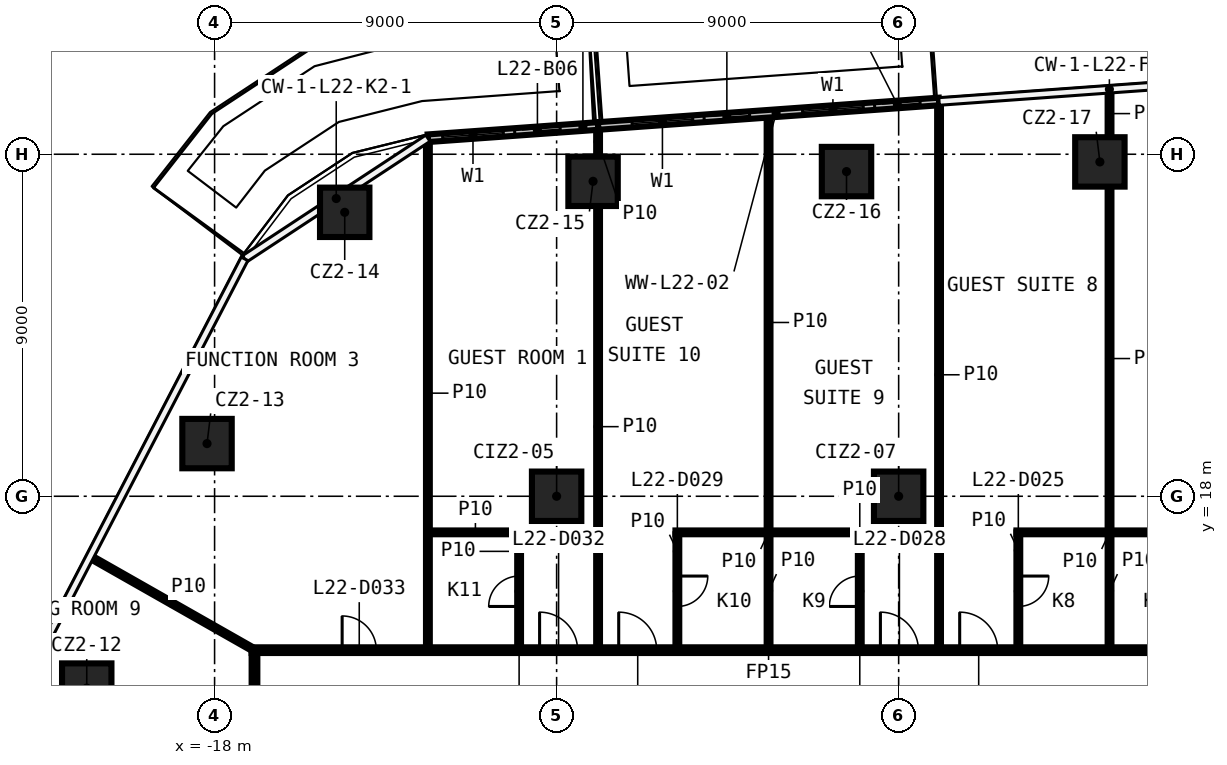
"""IFC4 building model, lengths in metres.
Left out: names, types, materials, properties, quantities, classifications, styles, units other than length and angle.
Written with IfcOpenShell. Run it as: python <this file> out.ifc"""

import sys

from ifc_helpers import new_model, si_unit, direction, frame, frame_2d, origin, origin_2d, place, context, subcontext, project, spatial, rectangle, extrude, element, fill, save


model = new_model("IFC4")
c1 = context("Model", 3, precision=1e-05, world=origin(), true_north=direction((0.0, 1.0)))
c2 = subcontext(c1, "Body", "Model", "MODEL_VIEW")
j1 = project(units=[si_unit("LENGTHUNIT", "METRE"), si_unit("PLANEANGLEUNIT", "RADIAN")], contexts=[c1])
p1 = place(None, origin())
s1 = spatial("IfcSite", under=j1, at=p1, CompositionType="ELEMENT")
p2 = place(p1, origin())
s2 = spatial("IfcBuilding", under=s1, at=p2, CompositionType="ELEMENT")
p3 = place(p2, frame((0.0, 0.0, 106.3)))
s3 = spatial("IfcBuildingStorey", under=s2, at=p3, CompositionType="ELEMENT", Elevation=106.3)
for number, where, z_axis, x_axis in (
    (1, (-21.364, 12.952, 0.0), (0.0, 0.0, 1.0), (1.0, 0.0, 0.0)),
    (2, (-18.199, 19.386, 0.0), (0.0, 0.0, 1.0), (1.0, 0.0, 0.0)),
    (3, (-14.576, 25.472, 0.0), (0.0, 0.0, 1.0), (1.0, 0.0, 0.0)),
    (4, (-8.041, 26.288, 0.0), (0.0, 0.0, 1.0), (1.0, 0.0, 0.0)),
    (5, (-1.372, 26.544, 0.0), (0.0, 0.0, 1.0), (1.0, 0.0, 0.0)),
    (6, (5.295, 26.798, 0.0), (0.0, 0.0, 1.0), (1.0, 0.0, 0.0)),
    (7, (-9.0, 18.0, 0.0), (0.0, 0.0, 1.0), (1.0, 0.0, 0.0)),
    (8, (0.0, 18.0, 0.0), (0.0, 0.0, 1.0), (1.0, 0.0, 0.0)),
):
    element("IfcColumn", number, at=place(p3, frame(where, z_axis=z_axis, x_axis=x_axis)), inside=s3, PredefinedType="COLUMN", context=c2, shape_type="SweptSolid", body=[
        extrude(rectangle(XDim=1.3, YDim=1.3, at=origin_2d()), origin(), (0.0, 0.0, 1.0), 3.3),
    ])
p4 = place(p3, frame((-17.025, 13.95, 0.0), z_axis=(0.0, 0.0, 1.0), x_axis=(1.0, 0.0, 0.0)))
e9 = element("IfcWall", 9, at=p4, inside=s3, PredefinedType="PARTITIONING", context=c2, shape_type="SweptSolid", body=[
    extrude(rectangle(XDim=34.05, YDim=0.15, at=frame_2d((17.025, 0.0))), origin(), (0.0, 0.0, 1.0), 3.3),
])
p5 = place(p4, frame((29.735, 0.0, 0.0)))
e10 = element("IfcOpeningElement", 10, at=p5, cuts=e9, PredefinedType="OPENING", context=c2, shape_type="SweptSolid", body=[
    extrude(rectangle(XDim=1.0, YDim=2.1, at=frame_2d((0.5, 1.05))), frame((0.0, 0.085, 0.0), z_axis=(0.0, -1.0, 0.0), x_axis=(1.0, 0.0, 0.0)), (0.0, 0.0, 1.0), 0.17),
])
p6 = place(p4, frame((25.513, 0.0, 0.0)))
e11 = element("IfcOpeningElement", 11, at=p6, cuts=e9, PredefinedType="OPENING", context=c2, shape_type="SweptSolid", body=[
    extrude(rectangle(XDim=1.0, YDim=2.1, at=frame_2d((0.5, 1.05))), frame((0.0, 0.085, 0.0), z_axis=(0.0, -1.0, 0.0), x_axis=(1.0, 0.0, 0.0)), (0.0, 0.0, 1.0), 0.17),
])
p7 = place(p4, frame((18.631, 0.0, 0.0)))
e12 = element("IfcOpeningElement", 12, at=p7, cuts=e9, PredefinedType="OPENING", context=c2, shape_type="SweptSolid", body=[
    extrude(rectangle(XDim=1.0, YDim=2.1, at=frame_2d((0.5, 1.05))), frame((0.0, 0.085, 0.0), z_axis=(0.0, -1.0, 0.0), x_axis=(1.0, 0.0, 0.0)), (0.0, 0.0, 1.0), 0.17),
])
p8 = place(p4, frame((16.545, 0.0, 0.0)))
e13 = element("IfcOpeningElement", 13, at=p8, cuts=e9, PredefinedType="OPENING", context=c2, shape_type="SweptSolid", body=[
    extrude(rectangle(XDim=1.0, YDim=2.1, at=frame_2d((0.5, 1.05))), frame((0.0, 0.085, 0.0), z_axis=(0.0, -1.0, 0.0), x_axis=(1.0, 0.0, 0.0)), (0.0, 0.0, 1.0), 0.17),
])
p9 = place(p4, frame((9.659, 0.0, 0.0)))
e14 = element("IfcOpeningElement", 14, at=p9, cuts=e9, PredefinedType="OPENING", context=c2, shape_type="SweptSolid", body=[
    extrude(rectangle(XDim=1.0, YDim=2.1, at=frame_2d((0.5, 1.05))), frame((0.0, 0.085, 0.0), z_axis=(0.0, -1.0, 0.0), x_axis=(1.0, 0.0, 0.0)), (0.0, 0.0, 1.0), 0.17),
])
p10 = place(p4, frame((7.577, 0.0, 0.0)))
e15 = element("IfcOpeningElement", 15, at=p10, cuts=e9, PredefinedType="OPENING", context=c2, shape_type="SweptSolid", body=[
    extrude(rectangle(XDim=1.0, YDim=2.1, at=frame_2d((0.5, 1.05))), frame((0.0, 0.085, 0.0), z_axis=(0.0, -1.0, 0.0), x_axis=(1.0, 0.0, 0.0)), (0.0, 0.0, 1.0), 0.17),
])
p11 = place(p4, frame((2.381, 0.0, 0.0)))
e16 = element("IfcOpeningElement", 16, at=p11, cuts=e9, PredefinedType="OPENING", context=c2, shape_type="SweptSolid", body=[
    extrude(rectangle(XDim=0.9, YDim=2.1, at=frame_2d((0.45, 1.05))), frame((0.0, 0.085, 0.0), z_axis=(0.0, -1.0, 0.0), x_axis=(1.0, 0.0, 0.0)), (0.0, 0.0, 1.0), 0.17),
])
p12 = place(p3, frame((-12.337, 17.05, 0.0), z_axis=(0.0, 0.0, 1.0), x_axis=(1.0, 0.0, 0.0)))
e17 = element("IfcWall", 17, at=p12, inside=s3, PredefinedType="PARTITIONING", context=c2, shape_type="SweptSolid", body=[
    extrude(rectangle(XDim=2.4, YDim=0.1, at=frame_2d((1.2, 0.0))), origin(), (0.0, 0.0, 1.0), 3.3),
])
for number, where, z_axis, x_axis in (
    (18, (-5.873, 17.05, 0.0), (0.0, 0.0, 1.0), (1.0, 0.0, 0.0)),
    (19, (3.099, 17.05, 0.0), (0.0, 0.0, 1.0), (1.0, 0.0, 0.0)),
):
    element("IfcWall", number, at=place(p3, frame(where, z_axis=z_axis, x_axis=x_axis)), inside=s3, PredefinedType="PARTITIONING", context=c2, shape_type="SweptSolid", body=[
        extrude(rectangle(XDim=4.9, YDim=0.1, at=frame_2d((2.45, 0.0))), origin(), (0.0, 0.0, 1.0), 3.3),
    ])
p13 = place(p3, frame((5.549, 14.025, 0.0), z_axis=(0.0, 0.0, 1.0), x_axis=(0.0, 1.0, 0.0)))
e20 = element("IfcWall", 20, at=p13, inside=s3, PredefinedType="PARTITIONING", context=c2, shape_type="SweptSolid", body=[
    extrude(rectangle(XDim=2.975, YDim=0.1, at=frame_2d((1.488, 0.0))), origin(), (0.0, 0.0, 1.0), 3.3),
])
p14 = place(p3, frame((5.549, 17.1, 0.0), z_axis=(0.0, 0.0, 1.0), x_axis=(0.0, 1.0, 0.0)))
e21 = element("IfcWall", 21, at=p14, inside=s3, PredefinedType="PARTITIONING", context=c2, shape_type="SweptSolid", body=[
    extrude(rectangle(XDim=9.048, YDim=0.1, at=frame_2d((4.524, 0.0))), origin(), (0.0, 0.0, 1.0), 3.3),
])
p15 = place(p3, frame((5.549, 27.448, 0.0), z_axis=(0.0, 0.0, 1.0), x_axis=(0.0, 1.0, 0.0)))
e22 = element("IfcWall", 22, at=p15, inside=s3, PredefinedType="PARTITIONING", context=c2, shape_type="SweptSolid", body=[
    extrude(rectangle(XDim=1.243, YDim=0.1, at=frame_2d((0.622, 0.0))), origin(), (0.0, 0.0, 1.0), 3.3),
])
p16 = place(p3, frame((3.149, 17.05, 0.0), z_axis=(0.0, 0.0, 1.0), x_axis=(0.0, -1.0, 0.0)))
e23 = element("IfcWall", 23, at=p16, inside=s3, PredefinedType="PARTITIONING", context=c2, shape_type="SweptSolid", body=[
    extrude(rectangle(XDim=3.025, YDim=0.1, at=frame_2d((1.513, 0.0))), origin(), (0.0, 0.0, 1.0), 3.3),
])
p17 = place(p16, frame((1.15, 0.0, 0.0)))
e24 = element("IfcOpeningElement", 24, at=p17, cuts=e23, PredefinedType="OPENING", context=c2, shape_type="SweptSolid", body=[
    extrude(rectangle(XDim=0.8, YDim=2.1, at=frame_2d((0.4, 1.05))), frame((0.0, 0.06, 0.0), z_axis=(0.0, -1.0, 0.0), x_axis=(1.0, 0.0, 0.0)), (0.0, 0.0, 1.0), 0.12),
])
p18 = place(p3, frame((1.063, 14.025, 0.0), z_axis=(0.0, 0.0, 1.0), x_axis=(0.0, 1.0, 0.0)))
e25 = element("IfcWall", 25, at=p18, inside=s3, PredefinedType="PARTITIONING", context=c2, shape_type="SweptSolid", body=[
    extrude(rectangle(XDim=14.344, YDim=0.1, at=frame_2d((7.172, 0.0))), origin(), (0.0, 0.0, 1.0), 3.3),
])
p19 = place(p3, frame((-1.023, 14.025, 0.0), z_axis=(0.0, 0.0, 1.0), x_axis=(0.0, 1.0, 0.0)))
e26 = element("IfcWall", 26, at=p19, inside=s3, PredefinedType="PARTITIONING", context=c2, shape_type="SweptSolid", body=[
    extrude(rectangle(XDim=3.025, YDim=0.1, at=frame_2d((1.513, 0.0))), origin(), (0.0, 0.0, 1.0), 3.3),
])
p20 = place(p19, frame((1.075, 0.0, 0.0)))
e27 = element("IfcOpeningElement", 27, at=p20, cuts=e26, PredefinedType="OPENING", context=c2, shape_type="SweptSolid", body=[
    extrude(rectangle(XDim=0.8, YDim=2.1, at=frame_2d((0.4, 1.05))), frame((0.0, 0.06, 0.0), z_axis=(0.0, -1.0, 0.0), x_axis=(1.0, 0.0, 0.0)), (0.0, 0.0, 1.0), 0.12),
])
p21 = place(p3, frame((-3.423, 14.025, 0.0), z_axis=(0.0, 0.0, 1.0), x_axis=(0.0, 1.0, 0.0)))
e28 = element("IfcWall", 28, at=p21, inside=s3, PredefinedType="PARTITIONING", context=c2, shape_type="SweptSolid", body=[
    extrude(rectangle(XDim=2.975, YDim=0.1, at=frame_2d((1.488, 0.0))), origin(), (0.0, 0.0, 1.0), 3.3),
])
p22 = place(p3, frame((-3.423, 17.1, 0.0), z_axis=(0.0, 0.0, 1.0), x_axis=(0.0, 1.0, 0.0)))
e29 = element("IfcWall", 29, at=p22, inside=s3, PredefinedType="PARTITIONING", context=c2, shape_type="SweptSolid", body=[
    extrude(rectangle(XDim=10.946, YDim=0.1, at=frame_2d((5.473, 0.0))), origin(), (0.0, 0.0, 1.0), 3.3),
])
p23 = place(p3, frame((-5.823, 17.0, 0.0), z_axis=(0.0, 0.0, 1.0), x_axis=(0.0, -1.0, 0.0)))
e30 = element("IfcWall", 30, at=p23, inside=s3, PredefinedType="PARTITIONING", context=c2, shape_type="SweptSolid", body=[
    extrude(rectangle(XDim=2.975, YDim=0.1, at=frame_2d((1.488, 0.0))), origin(), (0.0, 0.0, 1.0), 3.3),
])
p24 = place(p23, frame((1.1, 0.0, 0.0)))
e31 = element("IfcOpeningElement", 31, at=p24, cuts=e30, PredefinedType="OPENING", context=c2, shape_type="SweptSolid", body=[
    extrude(rectangle(XDim=0.8, YDim=2.1, at=frame_2d((0.4, 1.05))), frame((0.0, 0.06, 0.0), z_axis=(0.0, -1.0, 0.0), x_axis=(1.0, 0.0, 0.0)), (0.0, 0.0, 1.0), 0.12),
])
p25 = place(p3, frame((-7.909, 14.025, 0.0), z_axis=(0.0, 0.0, 1.0), x_axis=(0.0, 1.0, 0.0)))
e32 = element("IfcWall", 32, at=p25, inside=s3, PredefinedType="PARTITIONING", context=c2, shape_type="SweptSolid", body=[
    extrude(rectangle(XDim=11.613, YDim=0.1, at=frame_2d((5.807, 0.0))), origin(), (0.0, 0.0, 1.0), 3.3),
])
p26 = place(p3, frame((-7.909, 26.938, 0.0), z_axis=(0.0, 0.0, 1.0), x_axis=(0.0, 1.0, 0.0)))
e33 = element("IfcWall", 33, at=p26, inside=s3, PredefinedType="PARTITIONING", context=c2, shape_type="SweptSolid", body=[
    extrude(rectangle(XDim=0.785, YDim=0.1, at=frame_2d((0.393, 0.0))), origin(), (0.0, 0.0, 1.0), 3.3),
])
p27 = place(p3, frame((-9.987, 14.025, 0.0), z_axis=(0.0, 0.0, 1.0), x_axis=(0.0, 1.0, 0.0)))
e34 = element("IfcWall", 34, at=p27, inside=s3, PredefinedType="PARTITIONING", context=c2, shape_type="SweptSolid", body=[
    extrude(rectangle(XDim=2.975, YDim=0.1, at=frame_2d((1.488, 0.0))), origin(), (0.0, 0.0, 1.0), 3.3),
])
p28 = place(p27, frame((1.075, 0.0, 0.0)))
e35 = element("IfcOpeningElement", 35, at=p28, cuts=e34, PredefinedType="OPENING", context=c2, shape_type="SweptSolid", body=[
    extrude(rectangle(XDim=0.8, YDim=2.1, at=frame_2d((0.4, 1.05))), frame((0.0, 0.06, 0.0), z_axis=(0.0, -1.0, 0.0), x_axis=(1.0, 0.0, 0.0)), (0.0, 0.0, 1.0), 0.12),
])
p29 = place(p3, frame((-12.387, 14.025, 0.0), z_axis=(0.0, 0.0, 1.0), x_axis=(0.0, 1.0, 0.0)))
e36 = element("IfcWall", 36, at=p29, inside=s3, PredefinedType="PARTITIONING", context=c2, shape_type="SweptSolid", body=[
    extrude(rectangle(XDim=13.376, YDim=0.1, at=frame_2d((6.688, 0.0))), origin(), (0.0, 0.0, 1.0), 3.3),
])
p30 = place(p3, frame((-16.95, -13.875, 0.0), z_axis=(0.0, 0.0, 1.0), x_axis=(0.0, 1.0, 0.0)))
e37 = element("IfcWall", 37, at=p30, inside=s3, PredefinedType="PARTITIONING", context=c2, shape_type="SweptSolid", body=[
    extrude(rectangle(XDim=27.75, YDim=0.15, at=frame_2d((13.875, 0.0))), origin(), (0.0, 0.0, 1.0), 3.3),
])
p31 = place(p30, frame((11.06, 0.0, 0.0)))
e38 = element("IfcOpeningElement", 38, at=p31, cuts=e37, PredefinedType="OPENING", context=c2, shape_type="SweptSolid", body=[
    extrude(rectangle(XDim=0.9, YDim=2.1, at=frame_2d((0.45, 1.05))), frame((0.0, 0.085, 0.0), z_axis=(0.0, -1.0, 0.0), x_axis=(1.0, 0.0, 0.0)), (0.0, 0.0, 1.0), 0.17),
])
p32 = place(p30, frame((8.387, 0.0, 0.0)))
e39 = element("IfcOpeningElement", 39, at=p32, cuts=e37, PredefinedType="OPENING", context=c2, shape_type="SweptSolid", body=[
    extrude(rectangle(XDim=0.9, YDim=2.1, at=frame_2d((0.45, 1.05))), frame((0.0, 0.085, 0.0), z_axis=(0.0, -1.0, 0.0), x_axis=(1.0, 0.0, 0.0)), (0.0, 0.0, 1.0), 0.17),
])
p33 = place(p30, frame((1.666, 0.0, 0.0)))
e40 = element("IfcOpeningElement", 40, at=p33, cuts=e37, PredefinedType="OPENING", context=c2, shape_type="SweptSolid", body=[
    extrude(rectangle(XDim=0.9, YDim=2.1, at=frame_2d((0.45, 1.05))), frame((0.0, 0.085, 0.0), z_axis=(0.0, -1.0, 0.0), x_axis=(1.0, 0.0, 0.0)), (0.0, 0.0, 1.0), 0.17),
])
p34 = place(p30, frame((25.152, 0.0, 0.0)))
e41 = element("IfcOpeningElement", 41, at=p34, cuts=e37, PredefinedType="OPENING", context=c2, shape_type="SweptSolid", body=[
    extrude(rectangle(XDim=0.9, YDim=2.1, at=frame_2d((0.45, 1.05))), frame((0.0, 0.085, 0.0), z_axis=(0.0, -1.0, 0.0), x_axis=(1.0, 0.0, 0.0)), (0.0, 0.0, 1.0), 0.17),
])
p35 = place(p30, frame((18.782, 0.0, 0.0)))
e42 = element("IfcOpeningElement", 42, at=p35, cuts=e37, PredefinedType="OPENING", context=c2, shape_type="SweptSolid", body=[
    extrude(rectangle(XDim=1.0, YDim=2.1, at=frame_2d((0.5, 1.05))), frame((0.0, 0.085, 0.0), z_axis=(0.0, -1.0, 0.0), x_axis=(1.0, 0.0, 0.0)), (0.0, 0.0, 1.0), 0.17),
])
p36 = place(p30, frame((17.26, 0.0, 0.0)))
e43 = element("IfcOpeningElement", 43, at=p36, cuts=e37, PredefinedType="OPENING", context=c2, shape_type="SweptSolid", body=[
    extrude(rectangle(XDim=1.0, YDim=2.1, at=frame_2d((0.5, 1.05))), frame((0.0, 0.085, 0.0), z_axis=(0.0, -1.0, 0.0), x_axis=(1.0, 0.0, 0.0)), (0.0, 0.0, 1.0), 0.17),
])
p37 = place(p3, frame((-21.264, 16.401, 0.0), z_axis=(0.0, 0.0, 1.0), x_axis=(0.869409483432, -0.494092248592, 0.0)))
e44 = element("IfcWall", 44, at=p37, inside=s3, PredefinedType="PARTITIONING", context=c2, shape_type="SweptSolid", body=[
    extrude(rectangle(XDim=4.962, YDim=0.1, at=frame_2d((2.481, 0.0))), origin(), (0.0, 0.0, 1.0), 3.3),
])
p38 = place(p3, frame((1.063, 28.389, 0.0), z_axis=(0.0, 0.0, 1.0), x_axis=(-0.997421921005, -0.071760096847, 0.0)))
e45 = element("IfcWall", 45, at=p38, inside=s3, PredefinedType="SOLIDWALL", context=c2, shape_type="SweptSolid", body=[
    extrude(rectangle(XDim=8.995, YDim=0.2, at=frame_2d((4.498, 0.0))), origin(), (0.0, 0.0, 1.0), 3.3),
])
p39 = place(p38, frame((2.0, 0.0, 0.6)))
e46 = element("IfcOpeningElement", 46, at=p39, cuts=e45, PredefinedType="OPENING", context=c2, shape_type="SweptSolid", body=[
    extrude(rectangle(XDim=1.6, YDim=2.4, at=frame_2d((0.8, 1.2))), frame((0.0, 0.11, 0.0), z_axis=(0.0, -1.0, 0.0), x_axis=(1.0, 0.0, 0.0)), (0.0, 0.0, 1.0), 0.22),
])
p40 = place(p38, frame((0.5, 0.0, 0.0)))
e47 = element("IfcOpeningElement", 47, at=p40, cuts=e45, PredefinedType="OPENING", context=c2, shape_type="SweptSolid", body=[
    extrude(rectangle(XDim=1.2, YDim=2.4, at=frame_2d((0.6, 1.2))), frame((0.0, 0.11, 0.0), z_axis=(0.0, -1.0, 0.0), x_axis=(1.0, 0.0, 0.0)), (0.0, 0.0, 1.0), 0.22),
])
p41 = place(p38, frame((6.498, 0.0, 0.6)))
e48 = element("IfcOpeningElement", 48, at=p41, cuts=e45, PredefinedType="OPENING", context=c2, shape_type="SweptSolid", body=[
    extrude(rectangle(XDim=1.6, YDim=2.4, at=frame_2d((0.8, 1.2))), frame((0.0, 0.11, 0.0), z_axis=(0.0, -1.0, 0.0), x_axis=(1.0, 0.0, 0.0)), (0.0, 0.0, 1.0), 0.22),
])
p42 = place(p38, frame((4.998, 0.0, 0.0)))
e49 = element("IfcOpeningElement", 49, at=p42, cuts=e45, PredefinedType="OPENING", context=c2, shape_type="SweptSolid", body=[
    extrude(rectangle(XDim=1.2, YDim=2.4, at=frame_2d((0.6, 1.2))), frame((0.0, 0.11, 0.0), z_axis=(0.0, -1.0, 0.0), x_axis=(1.0, 0.0, 0.0)), (0.0, 0.0, 1.0), 0.22),
])
p43 = place(p3, frame((-7.909, 27.743, 0.0), z_axis=(0.0, 0.0, 1.0), x_axis=(-0.997423796537, -0.071734023317, 0.0)))
e50 = element("IfcWall", 50, at=p43, inside=s3, PredefinedType="SOLIDWALL", context=c2, shape_type="SweptSolid", body=[
    extrude(rectangle(XDim=4.489, YDim=0.2, at=frame_2d((2.245, 0.0))), origin(), (0.0, 0.0, 1.0), 3.3),
])
p44 = place(p43, frame((2.5, 0.0, 0.6)))
e51 = element("IfcOpeningElement", 51, at=p44, cuts=e50, PredefinedType="OPENING", context=c2, shape_type="SweptSolid", body=[
    extrude(rectangle(XDim=1.6, YDim=2.4, at=frame_2d((0.8, 1.2))), frame((0.0, 0.11, 0.0), z_axis=(0.0, -1.0, 0.0), x_axis=(1.0, 0.0, 0.0)), (0.0, 0.0, 1.0), 0.22),
])
p45 = place(p43, frame((1.0, 0.0, 0.0)))
e52 = element("IfcOpeningElement", 52, at=p45, cuts=e50, PredefinedType="OPENING", context=c2, shape_type="SweptSolid", body=[
    extrude(rectangle(XDim=1.2, YDim=2.4, at=frame_2d((0.6, 1.2))), frame((0.0, 0.11, 0.0), z_axis=(0.0, -1.0, 0.0), x_axis=(1.0, 0.0, 0.0)), (0.0, 0.0, 1.0), 0.22),
])
p46 = place(p17, origin())
e53 = element("IfcDoor", 53, at=p46, inside=s3, OperationType="SINGLE_SWING_LEFT", PredefinedType="DOOR", context=c2, shape_type="SweptSolid", body=[
    extrude(rectangle(XDim=0.8, YDim=2.1, at=frame_2d((0.4, 1.05))), frame((0.0, 0.025, 0.0), z_axis=(0.0, -1.0, 0.0), x_axis=(1.0, 0.0, 0.0)), (0.0, 0.0, 1.0), 0.05),
])
fill(e24, e53)
p47 = place(p7, origin())
e54 = element("IfcDoor", 54, at=p47, inside=s3, OperationType="SINGLE_SWING_RIGHT", PredefinedType="DOOR", context=c2, shape_type="SweptSolid", body=[
    extrude(rectangle(XDim=1.0, YDim=2.1, at=frame_2d((0.5, 1.05))), frame((0.0, 0.025, 0.0), z_axis=(0.0, -1.0, 0.0), x_axis=(1.0, 0.0, 0.0)), (0.0, 0.0, 1.0), 0.05),
])
fill(e12, e54)
p48 = place(p20, origin())
e55 = element("IfcDoor", 55, at=p48, inside=s3, OperationType="SINGLE_SWING_RIGHT", PredefinedType="DOOR", context=c2, shape_type="SweptSolid", body=[
    extrude(rectangle(XDim=0.8, YDim=2.1, at=frame_2d((0.4, 1.05))), frame((0.0, 0.025, 0.0), z_axis=(0.0, -1.0, 0.0), x_axis=(1.0, 0.0, 0.0)), (0.0, 0.0, 1.0), 0.05),
])
fill(e27, e55)
p49 = place(p8, origin())
e56 = element("IfcDoor", 56, at=p49, inside=s3, OperationType="SINGLE_SWING_LEFT", PredefinedType="DOOR", context=c2, shape_type="SweptSolid", body=[
    extrude(rectangle(XDim=1.0, YDim=2.1, at=frame_2d((0.5, 1.05))), frame((0.0, 0.025, 0.0), z_axis=(0.0, -1.0, 0.0), x_axis=(1.0, 0.0, 0.0)), (0.0, 0.0, 1.0), 0.05),
])
fill(e13, e56)
p50 = place(p24, origin())
e57 = element("IfcDoor", 57, at=p50, inside=s3, OperationType="SINGLE_SWING_LEFT", PredefinedType="DOOR", context=c2, shape_type="SweptSolid", body=[
    extrude(rectangle(XDim=0.8, YDim=2.1, at=frame_2d((0.4, 1.05))), frame((0.0, 0.025, 0.0), z_axis=(0.0, -1.0, 0.0), x_axis=(1.0, 0.0, 0.0)), (0.0, 0.0, 1.0), 0.05),
])
fill(e31, e57)
p51 = place(p9, origin())
e58 = element("IfcDoor", 58, at=p51, inside=s3, OperationType="SINGLE_SWING_RIGHT", PredefinedType="DOOR", context=c2, shape_type="SweptSolid", body=[
    extrude(rectangle(XDim=1.0, YDim=2.1, at=frame_2d((0.5, 1.05))), frame((0.0, 0.025, 0.0), z_axis=(0.0, -1.0, 0.0), x_axis=(1.0, 0.0, 0.0)), (0.0, 0.0, 1.0), 0.05),
])
fill(e14, e58)
p52 = place(p28, origin())
e59 = element("IfcDoor", 59, at=p52, inside=s3, OperationType="SINGLE_SWING_RIGHT", PredefinedType="DOOR", context=c2, shape_type="SweptSolid", body=[
    extrude(rectangle(XDim=0.8, YDim=2.1, at=frame_2d((0.4, 1.05))), frame((0.0, 0.025, 0.0), z_axis=(0.0, -1.0, 0.0), x_axis=(1.0, 0.0, 0.0)), (0.0, 0.0, 1.0), 0.05),
])
fill(e35, e59)
p53 = place(p10, origin())
e60 = element("IfcDoor", 60, at=p53, inside=s3, OperationType="SINGLE_SWING_LEFT", PredefinedType="DOOR", context=c2, shape_type="SweptSolid", body=[
    extrude(rectangle(XDim=1.0, YDim=2.1, at=frame_2d((0.5, 1.05))), frame((0.0, 0.025, 0.0), z_axis=(0.0, -1.0, 0.0), x_axis=(1.0, 0.0, 0.0)), (0.0, 0.0, 1.0), 0.05),
])
fill(e15, e60)
p54 = place(p11, origin())
e61 = element("IfcDoor", 61, at=p54, inside=s3, OperationType="SINGLE_SWING_RIGHT", PredefinedType="DOOR", context=c2, shape_type="SweptSolid", body=[
    extrude(rectangle(XDim=0.9, YDim=2.1, at=frame_2d((0.45, 1.05))), frame((0.0, 0.025, 0.0), z_axis=(0.0, -1.0, 0.0), x_axis=(1.0, 0.0, 0.0)), (0.0, 0.0, 1.0), 0.05),
])
fill(e16, e61)
p55 = place(p39, origin())
e62 = element("IfcWindow", 62, at=p55, inside=s3, PartitioningType="SINGLE_PANEL", PredefinedType="WINDOW", context=c2, shape_type="SweptSolid", body=[
    extrude(rectangle(XDim=1.6, YDim=2.4, at=frame_2d((0.8, 1.2))), frame((0.0, 0.03, 0.0), z_axis=(0.0, -1.0, 0.0), x_axis=(1.0, 0.0, 0.0)), (0.0, 0.0, 1.0), 0.06),
])
fill(e46, e62)
p56 = place(p40, origin())
e63 = element("IfcDoor", 63, at=p56, inside=s3, OperationType="SLIDING_TO_LEFT", PredefinedType="DOOR", context=c2, shape_type="SweptSolid", body=[
    extrude(rectangle(XDim=1.2, YDim=2.4, at=frame_2d((0.6, 1.2))), frame((0.0, 0.025, 0.0), z_axis=(0.0, -1.0, 0.0), x_axis=(1.0, 0.0, 0.0)), (0.0, 0.0, 1.0), 0.05),
])
fill(e47, e63)
p57 = place(p41, origin())
e64 = element("IfcWindow", 64, at=p57, inside=s3, PartitioningType="SINGLE_PANEL", PredefinedType="WINDOW", context=c2, shape_type="SweptSolid", body=[
    extrude(rectangle(XDim=1.6, YDim=2.4, at=frame_2d((0.8, 1.2))), frame((0.0, 0.03, 0.0), z_axis=(0.0, -1.0, 0.0), x_axis=(1.0, 0.0, 0.0)), (0.0, 0.0, 1.0), 0.06),
])
fill(e48, e64)
p58 = place(p42, origin())
e65 = element("IfcDoor", 65, at=p58, inside=s3, OperationType="SLIDING_TO_LEFT", PredefinedType="DOOR", context=c2, shape_type="SweptSolid", body=[
    extrude(rectangle(XDim=1.2, YDim=2.4, at=frame_2d((0.6, 1.2))), frame((0.0, 0.025, 0.0), z_axis=(0.0, -1.0, 0.0), x_axis=(1.0, 0.0, 0.0)), (0.0, 0.0, 1.0), 0.05),
])
fill(e49, e65)
p59 = place(p44, origin())
e66 = element("IfcWindow", 66, at=p59, inside=s3, PartitioningType="SINGLE_PANEL", PredefinedType="WINDOW", context=c2, shape_type="SweptSolid", body=[
    extrude(rectangle(XDim=1.6, YDim=2.4, at=frame_2d((0.8, 1.2))), frame((0.0, 0.03, 0.0), z_axis=(0.0, -1.0, 0.0), x_axis=(1.0, 0.0, 0.0)), (0.0, 0.0, 1.0), 0.06),
])
fill(e51, e66)
p60 = place(p45, origin())
e67 = element("IfcDoor", 67, at=p60, inside=s3, OperationType="SLIDING_TO_LEFT", PredefinedType="DOOR", context=c2, shape_type="SweptSolid", body=[
    extrude(rectangle(XDim=1.2, YDim=2.4, at=frame_2d((0.6, 1.2))), frame((0.0, 0.025, 0.0), z_axis=(0.0, -1.0, 0.0), x_axis=(1.0, 0.0, 0.0)), (0.0, 0.0, 1.0), 0.05),
])
fill(e52, e67)
save(model, sys.argv[1])
